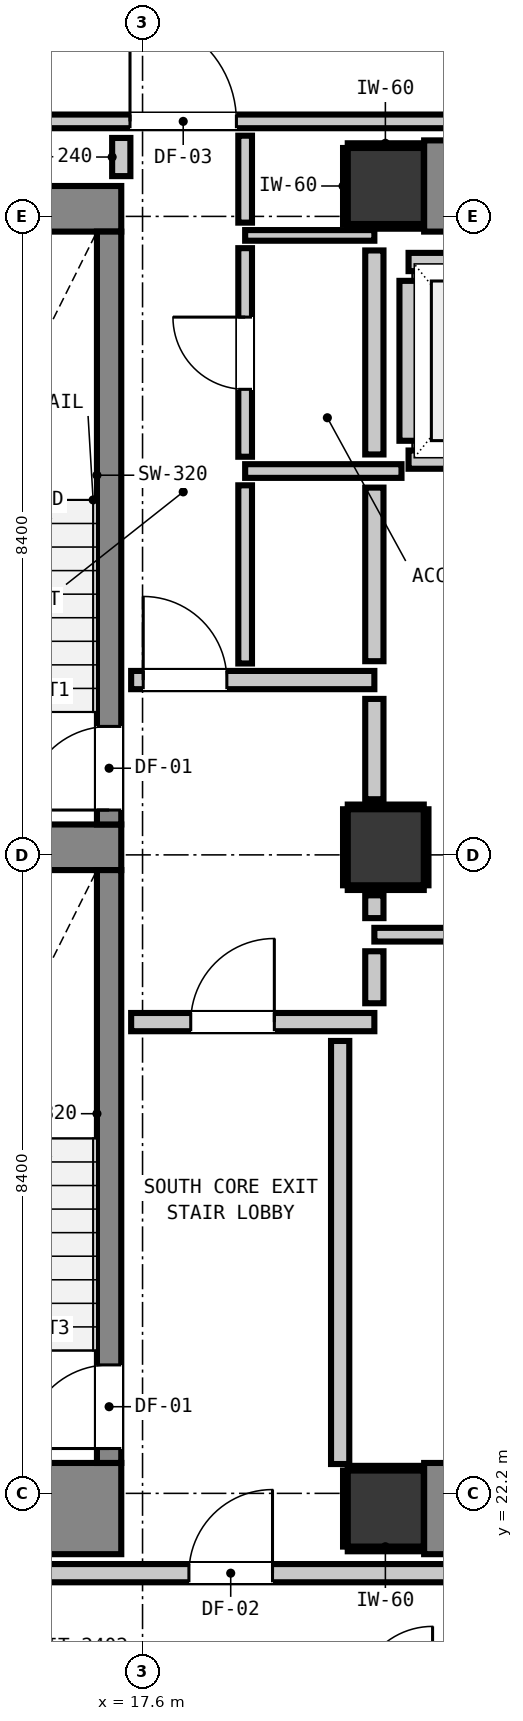
"""IFC4 building model, lengths in metres.
Left out: names, types, materials, properties, quantities, classifications, styles, units other than length and angle.
Written with IfcOpenShell. Run it as: python <this file> out.ifc"""

import sys

from ifc_helpers import new_model, si_unit, direction, frame, frame_2d, origin, origin_2d, place, context, subcontext, project, spatial, rectangle, extrude, element, fill, save


model = new_model("IFC4")
c1 = context("Model", 3, precision=1e-05, world=origin(), true_north=direction((0.0, 1.0)))
c2 = subcontext(c1, "Body", "Model", "MODEL_VIEW")
j1 = project(units=[si_unit("LENGTHUNIT", "METRE"), si_unit("PLANEANGLEUNIT", "RADIAN")], contexts=[c1])
p1 = place(None, origin())
s1 = spatial("IfcSite", under=j1, at=p1, CompositionType="ELEMENT")
p2 = place(p1, origin())
s2 = spatial("IfcBuilding", under=s1, at=p2, CompositionType="ELEMENT")
p3 = place(p2, frame((0.0, 0.0, 85.08)))
s3 = spatial("IfcBuildingStorey", under=s2, at=p3, CompositionType="ELEMENT", Elevation=85.08)
for number, where, z_axis, x_axis in (
    (1, (20.8, 22.0, 0.0), (0.0, 0.0, 1.0), (1.0, 0.0, 0.0)),
    (2, (20.8, 39.4, 0.0), (0.0, 0.0, 1.0), (1.0, 0.0, 0.0)),
):
    element("IfcColumn", number, at=place(p3, frame(where, z_axis=z_axis, x_axis=x_axis)), inside=s3, PredefinedType="COLUMN", context=c2, shape_type="SweptSolid", body=[
        extrude(rectangle(XDim=1.0, YDim=1.0, at=origin_2d()), origin(), (0.0, 0.0, 1.0), 3.32),
    ])
p4 = place(p3, frame((13.24, 22.0, 0.0), z_axis=(0.0, 0.0, 1.0), x_axis=(1.0, 0.0, 0.0)))
e3 = element("IfcWall", 3, at=p4, inside=s3, PredefinedType="SHEAR", context=c2, shape_type="SweptSolid", body=[
    extrude(rectangle(XDim=4.08, YDim=1.2, at=frame_2d((2.04, 0.0))), origin(), (0.0, 0.0, 1.0), 3.32),
])
p5 = place(p3, frame((13.24, 39.1, 0.0), z_axis=(0.0, 0.0, 1.0), x_axis=(1.0, 0.0, 0.0)))
e4 = element("IfcWall", 4, at=p5, inside=s3, PredefinedType="SHEAR", context=c2, shape_type="SweptSolid", body=[
    extrude(rectangle(XDim=4.08, YDim=0.6, at=frame_2d((2.04, 0.0))), origin(), (0.0, 0.0, 1.0), 3.32),
])
p6 = place(p3, frame((13.905, 30.7, 0.0), z_axis=(0.0, 0.0, 1.0), x_axis=(1.0, 0.0, 0.0)))
e5 = element("IfcWall", 5, at=p6, inside=s3, PredefinedType="SHEAR", context=c2, shape_type="SweptSolid", body=[
    extrude(rectangle(XDim=3.415, YDim=0.6, at=frame_2d((1.708, 0.0))), origin(), (0.0, 0.0, 1.0), 3.32),
])
for number, where, z_axis, x_axis in (
    (6, (21.305, 22.0, 0.0), (0.0, 0.0, 1.0), (1.0, 0.0, 0.0)),
    (7, (21.305, 39.4, 0.0), (0.0, 0.0, 1.0), (1.0, 0.0, 0.0)),
):
    element("IfcWall", number, at=place(p3, frame(where, z_axis=z_axis, x_axis=x_axis)), inside=s3, PredefinedType="SHEAR", context=c2, shape_type="SweptSolid", body=[
        extrude(rectangle(XDim=7.39, YDim=1.2, at=frame_2d((3.695, 0.0))), origin(), (0.0, 0.0, 1.0), 3.32),
    ])
p7 = place(p3, frame((17.16, 31.0, 0.0), z_axis=(0.0, 0.0, 1.0), x_axis=(0.0, 1.0, 0.0)))
e8 = element("IfcWall", 8, at=p7, inside=s3, PredefinedType="SHEAR", context=c2, shape_type="SweptSolid", body=[
    extrude(rectangle(XDim=7.8, YDim=0.32, at=frame_2d((3.9, 0.0))), origin(), (0.0, 0.0, 1.0), 3.32),
])
p8 = place(p7, frame((0.19, 0.0, 0.0)))
e9 = element("IfcOpeningElement", 9, at=p8, cuts=e8, PredefinedType="OPENING", context=c2, shape_type="SweptSolid", body=[
    extrude(rectangle(XDim=1.1, YDim=2.15, at=frame_2d((0.55, 1.075))), frame((0.0, 0.17, 0.0), z_axis=(0.0, -1.0, 0.0), x_axis=(1.0, 0.0, 0.0)), (0.0, 0.0, 1.0), 0.34),
])
p9 = place(p3, frame((17.16, 22.6, 0.0), z_axis=(0.0, 0.0, 1.0), x_axis=(0.0, 1.0, 0.0)))
e10 = element("IfcWall", 10, at=p9, inside=s3, PredefinedType="SHEAR", context=c2, shape_type="SweptSolid", body=[
    extrude(rectangle(XDim=7.8, YDim=0.32, at=frame_2d((3.9, 0.0))), origin(), (0.0, 0.0, 1.0), 3.32),
])
p10 = place(p9, frame((0.19, 0.0, 0.0)))
e11 = element("IfcOpeningElement", 11, at=p10, cuts=e10, PredefinedType="OPENING", context=c2, shape_type="SweptSolid", body=[
    extrude(rectangle(XDim=1.1, YDim=2.15, at=frame_2d((0.55, 1.075))), frame((0.0, 0.17, 0.0), z_axis=(0.0, -1.0, 0.0), x_axis=(1.0, 0.0, 0.0)), (0.0, 0.0, 1.0), 0.34),
])
p11 = place(p3, frame((20.8, 30.7, 0.0), z_axis=(0.0, 0.0, 1.0), x_axis=(1.0, 0.0, 0.0)))
e12 = element("IfcColumn", 12, at=p11, inside=s3, PredefinedType="COLUMN", context=c2, shape_type="SweptSolid", body=[
    extrude(rectangle(XDim=1.0, YDim=1.0, at=origin_2d()), origin(), (0.0, 0.0, 1.0), 3.32),
])
for number, where, z_axis, x_axis in (
    (13, (21.1, 35.8, 0.0), (0.0, 0.0, 1.0), (1.0, 0.0, 0.0)),
    (14, (21.1, 38.4, 0.0), (0.0, 0.0, 1.0), (1.0, 0.0, 0.0)),
):
    element("IfcWall", number, at=place(p3, frame(where, z_axis=z_axis, x_axis=x_axis)), inside=s3, PredefinedType="PARTITIONING", context=c2, shape_type="SweptSolid", body=[
        extrude(rectangle(XDim=2.2, YDim=0.24, at=frame_2d((1.1, 0.0))), origin(), (0.0, 0.0, 1.0), 2.96),
    ])
p12 = place(p3, frame((21.1, 36.048, 0.0), z_axis=(0.0, 0.0, 1.0), x_axis=(0.0, 1.0, 0.0)))
e15 = element("IfcWall", 15, at=p12, inside=s3, PredefinedType="PARTITIONING", context=c2, shape_type="SweptSolid", body=[
    extrude(rectangle(XDim=2.104, YDim=0.24, at=frame_2d((1.052, 0.0))), origin(), (0.0, 0.0, 1.0), 2.195),
])
p13 = place(p3, frame((12.993, 21.15, 0.0), z_axis=(0.0, 0.0, 1.0), x_axis=(1.0, 0.0, 0.0)))
e16 = element("IfcWall", 16, at=p13, inside=s3, PredefinedType="PARTITIONING", context=c2, shape_type="SweptSolid", body=[
    extrude(rectangle(XDim=30.98, YDim=0.24, at=frame_2d((15.49, 0.0))), origin(), (0.0, 0.0, 1.0), 2.96),
])
p14 = place(p13, frame((5.217, 0.0, 0.0)))
e17 = element("IfcOpeningElement", 17, at=p14, cuts=e16, PredefinedType="OPENING", context=c2, shape_type="SweptSolid", body=[
    extrude(rectangle(XDim=1.1, YDim=2.15, at=frame_2d((0.55, 1.075))), frame((0.0, 0.13, 0.0), z_axis=(0.0, -1.0, 0.0), x_axis=(1.0, 0.0, 0.0)), (0.0, 0.0, 1.0), 0.26),
])
p15 = place(p13, frame((27.358, 0.0, 0.0)))
e18 = element("IfcOpeningElement", 18, at=p15, cuts=e16, PredefinedType="OPENING", context=c2, shape_type="SweptSolid", body=[
    extrude(rectangle(XDim=1.0, YDim=2.15, at=frame_2d((0.5, 1.075))), frame((0.0, 0.13, 0.0), z_axis=(0.0, -1.0, 0.0), x_axis=(1.0, 0.0, 0.0)), (0.0, 0.0, 1.0), 0.26),
])
p16 = place(p3, frame((17.45, 28.4, 0.0), z_axis=(0.0, 0.0, 1.0), x_axis=(1.0, 0.0, 0.0)))
e19 = element("IfcWall", 19, at=p16, inside=s3, PredefinedType="PARTITIONING", context=c2, shape_type="SweptSolid", body=[
    extrude(rectangle(XDim=3.2, YDim=0.24, at=frame_2d((1.6, 0.0))), origin(), (0.0, 0.0, 1.0), 2.96),
])
p17 = place(p16, frame((0.784, 0.0, 0.0)))
e20 = element("IfcOpeningElement", 20, at=p17, cuts=e19, PredefinedType="OPENING", context=c2, shape_type="SweptSolid", body=[
    extrude(rectangle(XDim=1.1, YDim=2.15, at=frame_2d((0.55, 1.075))), frame((0.0, 0.13, 0.0), z_axis=(0.0, -1.0, 0.0), x_axis=(1.0, 0.0, 0.0)), (0.0, 0.0, 1.0), 0.26),
])
p18 = place(p3, frame((17.45, 32.9, 0.0), z_axis=(0.0, 0.0, 1.0), x_axis=(1.0, 0.0, 0.0)))
e21 = element("IfcWall", 21, at=p18, inside=s3, PredefinedType="PARTITIONING", context=c2, shape_type="SweptSolid", body=[
    extrude(rectangle(XDim=3.2, YDim=0.24, at=frame_2d((1.6, 0.0))), origin(), (0.0, 0.0, 1.0), 2.96),
])
p19 = place(p18, frame((0.159, 0.0, 0.0)))
e22 = element("IfcOpeningElement", 22, at=p19, cuts=e21, PredefinedType="OPENING", context=c2, shape_type="SweptSolid", body=[
    extrude(rectangle(XDim=1.1, YDim=2.15, at=frame_2d((0.55, 1.075))), frame((0.0, 0.13, 0.0), z_axis=(0.0, -1.0, 0.0), x_axis=(1.0, 0.0, 0.0)), (0.0, 0.0, 1.0), 0.26),
])
p20 = place(p3, frame((20.65, 29.55, 0.0), z_axis=(0.0, 0.0, 1.0), x_axis=(1.0, 0.0, 0.0)))
e23 = element("IfcWall", 23, at=p20, inside=s3, PredefinedType="PARTITIONING", context=c2, shape_type="SweptSolid", body=[
    extrude(rectangle(XDim=9.325, YDim=0.18, at=frame_2d((4.663, 0.0))), origin(), (0.0, 0.0, 1.0), 2.96),
])
p21 = place(p3, frame((18.95, 35.65, 0.0), z_axis=(0.0, 0.0, 1.0), x_axis=(1.0, 0.0, 0.0)))
e24 = element("IfcWall", 24, at=p21, inside=s3, PredefinedType="PARTITIONING", context=c2, shape_type="SweptSolid", body=[
    extrude(rectangle(XDim=2.057, YDim=0.18, at=frame_2d((1.029, 0.0))), origin(), (0.0, 0.0, 1.0), 2.96),
])
p22 = place(p3, frame((1.827, 40.25, 0.0), z_axis=(0.0, 0.0, 1.0), x_axis=(1.0, 0.0, 0.0)))
e25 = element("IfcWall", 25, at=p22, inside=s3, PredefinedType="PARTITIONING", context=c2, shape_type="SweptSolid", body=[
    extrude(rectangle(XDim=42.146, YDim=0.18, at=frame_2d((21.073, 0.0))), origin(), (0.0, 0.0, 1.0), 2.96),
])
p23 = place(p22, frame((15.608, 0.0, 0.0)))
e26 = element("IfcOpeningElement", 26, at=p23, cuts=e25, PredefinedType="OPENING", context=c2, shape_type="SweptSolid", body=[
    extrude(rectangle(XDim=1.4, YDim=2.15, at=frame_2d((0.7, 1.075))), frame((0.0, 0.1, 0.0), z_axis=(0.0, -1.0, 0.0), x_axis=(1.0, 0.0, 0.0)), (0.0, 0.0, 1.0), 0.2),
])
p24 = place(p22, frame((8.647, 0.0, 0.0)))
e27 = element("IfcOpeningElement", 27, at=p24, cuts=e25, PredefinedType="OPENING", context=c2, shape_type="SweptSolid", body=[
    extrude(rectangle(XDim=1.4, YDim=2.15, at=frame_2d((0.7, 1.075))), frame((0.0, 0.1, 0.0), z_axis=(0.0, -1.0, 0.0), x_axis=(1.0, 0.0, 0.0)), (0.0, 0.0, 1.0), 0.2),
])
p25 = place(p22, frame((38.524, 0.0, 0.0)))
e28 = element("IfcOpeningElement", 28, at=p25, cuts=e25, PredefinedType="OPENING", context=c2, shape_type="SweptSolid", body=[
    extrude(rectangle(XDim=1.0, YDim=2.15, at=frame_2d((0.5, 1.075))), frame((0.0, 0.1, 0.0), z_axis=(0.0, -1.0, 0.0), x_axis=(1.0, 0.0, 0.0)), (0.0, 0.0, 1.0), 0.2),
])
p26 = place(p3, frame((18.95, 38.75, 0.0), z_axis=(0.0, 0.0, 1.0), x_axis=(1.0, 0.0, 0.0)))
e29 = element("IfcWall", 29, at=p26, inside=s3, PredefinedType="PARTITIONING", context=c2, shape_type="SweptSolid", body=[
    extrude(rectangle(XDim=1.7, YDim=0.14, at=frame_2d((0.85, 0.0))), origin(), (0.0, 0.0, 1.0), 2.96),
])
p27 = place(p3, frame((17.32, 39.53, 0.0), z_axis=(0.0, 0.0, 1.0), x_axis=(0.0, 1.0, 0.0)))
e30 = element("IfcWall", 30, at=p27, inside=s3, PredefinedType="PARTITIONING", context=c2, shape_type="SweptSolid", body=[
    extrude(rectangle(XDim=0.502, YDim=0.24, at=frame_2d((0.251, 0.0))), origin(), (0.0, 0.0, 1.0), 2.96),
])
p28 = place(p3, frame((20.2, 22.586, 0.0), z_axis=(0.0, 0.0, 1.0), x_axis=(0.0, 1.0, 0.0)))
e31 = element("IfcWall", 31, at=p28, inside=s3, PredefinedType="PARTITIONING", context=c2, shape_type="SweptSolid", body=[
    extrude(rectangle(XDim=5.566, YDim=0.24, at=frame_2d((2.783, 0.0))), origin(), (0.0, 0.0, 1.0), 2.96),
])
p29 = place(p3, frame((20.65, 28.648, 0.0), z_axis=(0.0, 0.0, 1.0), x_axis=(0.0, 1.0, 0.0)))
e32 = element("IfcWall", 32, at=p29, inside=s3, PredefinedType="PARTITIONING", context=c2, shape_type="SweptSolid", body=[
    extrude(rectangle(XDim=0.684, YDim=0.24, at=frame_2d((0.342, 0.0))), origin(), (0.0, 0.0, 1.0), 2.195),
])
p30 = place(p3, frame((20.65, 29.768, 0.0), z_axis=(0.0, 0.0, 1.0), x_axis=(0.0, 1.0, 0.0)))
e33 = element("IfcWall", 33, at=p30, inside=s3, PredefinedType="PARTITIONING", context=c2, shape_type="SweptSolid", body=[
    extrude(rectangle(XDim=0.3, YDim=0.24, at=frame_2d((0.15, 0.0))), origin(), (0.0, 0.0, 1.0), 2.195),
])
p31 = place(p3, frame((20.65, 31.332, 0.0), z_axis=(0.0, 0.0, 1.0), x_axis=(0.0, 1.0, 0.0)))
e34 = element("IfcWall", 34, at=p31, inside=s3, PredefinedType="PARTITIONING", context=c2, shape_type="SweptSolid", body=[
    extrude(rectangle(XDim=1.32, YDim=0.24, at=frame_2d((0.66, 0.0))), origin(), (0.0, 0.0, 1.0), 2.195),
])
p32 = place(p3, frame((20.65, 33.148, 0.0), z_axis=(0.0, 0.0, 1.0), x_axis=(0.0, 1.0, 0.0)))
e35 = element("IfcWall", 35, at=p32, inside=s3, PredefinedType="PARTITIONING", context=c2, shape_type="SweptSolid", body=[
    extrude(rectangle(XDim=2.284, YDim=0.24, at=frame_2d((1.142, 0.0))), origin(), (0.0, 0.0, 1.0), 2.195),
])
p33 = place(p3, frame((20.65, 35.868, 0.0), z_axis=(0.0, 0.0, 1.0), x_axis=(0.0, 1.0, 0.0)))
e36 = element("IfcWall", 36, at=p33, inside=s3, PredefinedType="PARTITIONING", context=c2, shape_type="SweptSolid", body=[
    extrude(rectangle(XDim=2.684, YDim=0.24, at=frame_2d((1.342, 0.0))), origin(), (0.0, 0.0, 1.0), 2.195),
])
p34 = place(p3, frame((18.95, 33.118, 0.0), z_axis=(0.0, 0.0, 1.0), x_axis=(0.0, 1.0, 0.0)))
e37 = element("IfcWall", 37, at=p34, inside=s3, PredefinedType="PARTITIONING", context=c2, shape_type="SweptSolid", body=[
    extrude(rectangle(XDim=2.344, YDim=0.18, at=frame_2d((1.172, 0.0))), origin(), (0.0, 0.0, 1.0), 2.96),
])
p35 = place(p3, frame((18.95, 35.838, 0.0), z_axis=(0.0, 0.0, 1.0), x_axis=(0.0, 1.0, 0.0)))
e38 = element("IfcWall", 38, at=p35, inside=s3, PredefinedType="PARTITIONING", context=c2, shape_type="SweptSolid", body=[
    extrude(rectangle(XDim=2.744, YDim=0.18, at=frame_2d((1.372, 0.0))), origin(), (0.0, 0.0, 1.0), 2.96),
])
p36 = place(p35, frame((0.887, 0.0, 0.0)))
e39 = element("IfcOpeningElement", 39, at=p36, cuts=e38, PredefinedType="OPENING", context=c2, shape_type="SweptSolid", body=[
    extrude(rectangle(XDim=0.95, YDim=2.1, at=frame_2d((0.475, 1.05))), frame((0.0, 0.1, 0.0), z_axis=(0.0, -1.0, 0.0), x_axis=(1.0, 0.0, 0.0)), (0.0, 0.0, 1.0), 0.2),
])
p37 = place(p3, frame((18.95, 38.918, 0.0), z_axis=(0.0, 0.0, 1.0), x_axis=(0.0, 1.0, 0.0)))
e40 = element("IfcWall", 40, at=p37, inside=s3, PredefinedType="PARTITIONING", context=c2, shape_type="SweptSolid", body=[
    extrude(rectangle(XDim=1.144, YDim=0.18, at=frame_2d((0.572, 0.0))), origin(), (0.0, 0.0, 1.0), 2.96),
])
for number, where, z_axis, x_axis in (
    (41, (20.3, 21.468, 0.0), (0.0, 0.0, 1.0), (1.0, 0.0, 0.0)),
    (42, (20.3, 22.532, 0.0), (0.0, 0.0, 1.0), (1.0, 0.0, 0.0)),
):
    element("IfcWall", number, at=place(p3, frame(where, z_axis=z_axis, x_axis=x_axis)), inside=s3, PredefinedType="PARTITIONING", context=c2, shape_type="SweptSolid", body=[
        extrude(rectangle(XDim=0.99, YDim=0.06, at=frame_2d((0.495, 0.0))), origin(), (0.0, 0.0, 1.0), 1.45),
    ])
p38 = place(p3, frame((20.268, 21.5, 0.0), z_axis=(0.0, 0.0, 1.0), x_axis=(0.0, 1.0, 0.0)))
e43 = element("IfcWall", 43, at=p38, inside=s3, PredefinedType="PARTITIONING", context=c2, shape_type="SweptSolid", body=[
    extrude(rectangle(XDim=1.0, YDim=0.06, at=frame_2d((0.5, 0.0))), origin(), (0.0, 0.0, 1.0), 1.45),
])
for number, where, z_axis, x_axis in (
    (44, (20.3, 38.868, 0.0), (0.0, 0.0, 1.0), (1.0, 0.0, 0.0)),
    (45, (20.3, 39.932, 0.0), (0.0, 0.0, 1.0), (1.0, 0.0, 0.0)),
):
    element("IfcWall", number, at=place(p3, frame(where, z_axis=z_axis, x_axis=x_axis)), inside=s3, PredefinedType="PARTITIONING", context=c2, shape_type="SweptSolid", body=[
        extrude(rectangle(XDim=0.99, YDim=0.06, at=frame_2d((0.495, 0.0))), origin(), (0.0, 0.0, 1.0), 1.45),
    ])
for number, where, z_axis, x_axis in (
    (46, (20.268, 38.9, 0.0), (0.0, 0.0, 1.0), (0.0, 1.0, 0.0)),
    (47, (20.3, 30.168, 0.0), (0.0, 0.0, 1.0), (1.0, 0.0, 0.0)),
    (48, (20.3, 31.232, 0.0), (0.0, 0.0, 1.0), (1.0, 0.0, 0.0)),
    (49, (20.268, 30.2, 0.0), (0.0, 0.0, 1.0), (0.0, 1.0, 0.0)),
    (50, (21.332, 30.2, 0.0), (0.0, 0.0, 1.0), (0.0, 1.0, 0.0)),
):
    element("IfcWall", number, at=place(p3, frame(where, z_axis=z_axis, x_axis=x_axis)), inside=s3, PredefinedType="PARTITIONING", context=c2, shape_type="SweptSolid", body=[
        extrude(rectangle(XDim=1.0, YDim=0.06, at=frame_2d((0.5, 0.0))), origin(), (0.0, 0.0, 1.0), 1.45),
    ])
p39 = place(p8, origin())
e51 = element("IfcDoor", 51, at=p39, inside=s3, OperationType="SINGLE_SWING_LEFT", PredefinedType="DOOR", context=c2, shape_type="SweptSolid", body=[
    extrude(rectangle(XDim=1.1, YDim=2.15, at=frame_2d((0.55, 1.075))), frame((0.0, 0.025, 0.0), z_axis=(0.0, -1.0, 0.0), x_axis=(1.0, 0.0, 0.0)), (0.0, 0.0, 1.0), 0.05),
])
fill(e9, e51)
p40 = place(p10, origin())
e52 = element("IfcDoor", 52, at=p40, inside=s3, OperationType="SINGLE_SWING_LEFT", PredefinedType="DOOR", context=c2, shape_type="SweptSolid", body=[
    extrude(rectangle(XDim=1.1, YDim=2.15, at=frame_2d((0.55, 1.075))), frame((0.0, 0.025, 0.0), z_axis=(0.0, -1.0, 0.0), x_axis=(1.0, 0.0, 0.0)), (0.0, 0.0, 1.0), 0.05),
])
fill(e11, e52)
p41 = place(p17, origin())
e53 = element("IfcDoor", 53, at=p41, inside=s3, OperationType="SINGLE_SWING_RIGHT", PredefinedType="DOOR", context=c2, shape_type="SweptSolid", body=[
    extrude(rectangle(XDim=1.1, YDim=2.15, at=frame_2d((0.55, 1.075))), frame((0.0, 0.025, 0.0), z_axis=(0.0, -1.0, 0.0), x_axis=(1.0, 0.0, 0.0)), (0.0, 0.0, 1.0), 0.05),
])
fill(e20, e53)
p42 = place(p19, origin())
e54 = element("IfcDoor", 54, at=p42, inside=s3, OperationType="SINGLE_SWING_LEFT", PredefinedType="DOOR", context=c2, shape_type="SweptSolid", body=[
    extrude(rectangle(XDim=1.1, YDim=2.15, at=frame_2d((0.55, 1.075))), frame((0.0, 0.025, 0.0), z_axis=(0.0, -1.0, 0.0), x_axis=(1.0, 0.0, 0.0)), (0.0, 0.0, 1.0), 0.05),
])
fill(e22, e54)
p43 = place(p14, origin())
e55 = element("IfcDoor", 55, at=p43, inside=s3, OperationType="SINGLE_SWING_RIGHT", PredefinedType="DOOR", context=c2, shape_type="SweptSolid", body=[
    extrude(rectangle(XDim=1.1, YDim=2.15, at=frame_2d((0.55, 1.075))), frame((0.0, 0.025, 0.0), z_axis=(0.0, -1.0, 0.0), x_axis=(1.0, 0.0, 0.0)), (0.0, 0.0, 1.0), 0.05),
])
fill(e17, e55)
p44 = place(p23, origin())
e56 = element("IfcDoor", 56, at=p44, inside=s3, OperationType="SINGLE_SWING_LEFT", PredefinedType="DOOR", context=c2, shape_type="SweptSolid", body=[
    extrude(rectangle(XDim=1.4, YDim=2.15, at=frame_2d((0.7, 1.075))), frame((0.0, 0.025, 0.0), z_axis=(0.0, -1.0, 0.0), x_axis=(1.0, 0.0, 0.0)), (0.0, 0.0, 1.0), 0.05),
])
fill(e26, e56)
p45 = place(p36, origin())
e57 = element("IfcDoor", 57, at=p45, inside=s3, OperationType="SINGLE_SWING_RIGHT", PredefinedType="DOOR", context=c2, shape_type="SweptSolid", body=[
    extrude(rectangle(XDim=0.95, YDim=2.1, at=frame_2d((0.475, 1.05))), frame((0.0, 0.025, 0.0), z_axis=(0.0, -1.0, 0.0), x_axis=(1.0, 0.0, 0.0)), (0.0, 0.0, 1.0), 0.05),
])
fill(e39, e57)
save(model, sys.argv[1])
